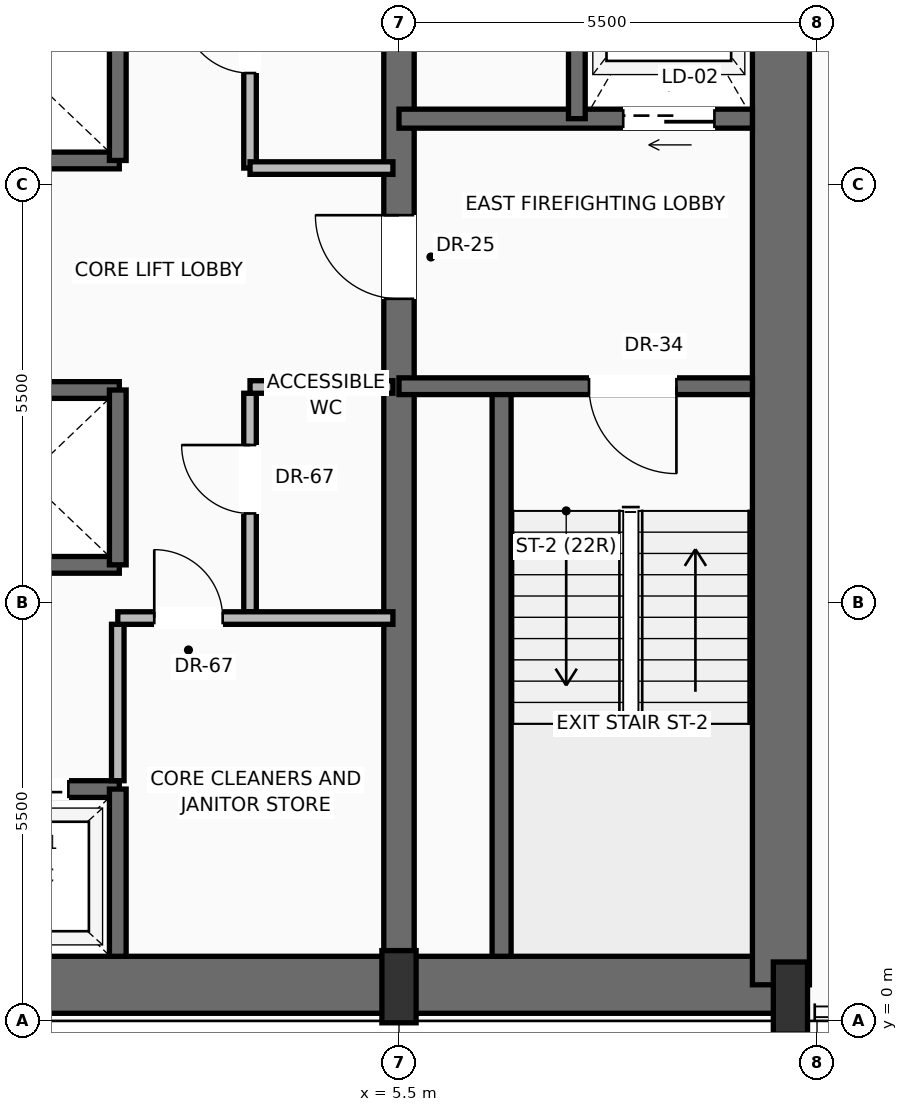
"""IFC4 building model, lengths in metres.
Left out: names, types, materials, properties, quantities, classifications, styles, units other than length and angle.
Written with IfcOpenShell. Run it as: python <this file> out.ifc"""

import sys

from ifc_helpers import new_model, si_unit, direction, frame, frame_2d, origin, origin_2d, place, context, subcontext, project, spatial, rectangle, extrude, source, transform, mapped, element, fill, save


model = new_model("IFC4")
c1 = context("Model", 3, precision=1e-05, world=origin(), true_north=direction((0.0, 1.0)))
c2 = subcontext(c1, "Body", "Model", "MODEL_VIEW")
j1 = project(units=[si_unit("LENGTHUNIT", "METRE"), si_unit("PLANEANGLEUNIT", "RADIAN")], contexts=[c1])
p1 = place(None, origin())
s1 = spatial("IfcSite", under=j1, at=p1, CompositionType="ELEMENT")
p2 = place(p1, origin())
s2 = spatial("IfcBuilding", under=s1, at=p2, CompositionType="ELEMENT")
p3 = place(p2, frame((0.0, 0.0, 98.8)))
s3 = spatial("IfcBuildingStorey", under=s2, at=p3, CompositionType="ELEMENT", Elevation=98.8)
p4 = place(p3, frame((-10.65, 0.475, 0.0), z_axis=(0.0, 0.0, 1.0), x_axis=(1.0, 0.0, 0.0)))
e1 = element("IfcWall", 1, at=p4, inside=s3, PredefinedType="SHEAR", context=c2, shape_type="SweptSolid", body=[
    extrude(rectangle(XDim=21.3, YDim=0.75, at=frame_2d((10.65, 0.0))), origin(), (0.0, 0.0, 1.0), 3.45),
])
p5 = place(p3, frame((10.525, 0.475, 0.0), z_axis=(0.0, 0.0, 1.0), x_axis=(0.0, 1.0, 0.0)))
e2 = element("IfcWall", 2, at=p5, inside=s3, PredefinedType="SHEAR", context=c2, shape_type="SweptSolid", body=[
    extrude(rectangle(XDim=15.65, YDim=0.75, at=frame_2d((7.825, 0.0))), origin(), (0.0, 0.0, 1.0), 3.45),
])
p6 = place(p3, frame((5.5, 0.475, 0.0), z_axis=(0.0, 0.0, 1.0), x_axis=(0.0, 1.0, 0.0)))
e3 = element("IfcWall", 3, at=p6, inside=s3, PredefinedType="SHEAR", context=c2, shape_type="SweptSolid", body=[
    extrude(rectangle(XDim=15.65, YDim=0.4, at=frame_2d((7.825, 0.0))), origin(), (0.0, 0.0, 1.0), 3.45),
])
p7 = place(p6, frame((9.025, 0.0, 0.0)))
e4 = element("IfcOpeningElement", 4, at=p7, cuts=e3, PredefinedType="OPENING", context=c2, shape_type="SweptSolid", body=[
    extrude(rectangle(XDim=1.1, YDim=2.2, at=frame_2d((0.55, 1.1))), frame((0.0, 0.21, 0.0), z_axis=(0.0, -1.0, 0.0), x_axis=(1.0, 0.0, 0.0)), (0.0, 0.0, 1.0), 0.42),
])
m1 = source(origin(), c2, "Body", "SweptSolid", [
    extrude(rectangle(XDim=0.45, YDim=0.95, at=origin_2d()), origin(), (0.0, 0.0, 1.0), 3.7),
])
for number, where, z_axis, x_axis in (
    (5, (5.5, 0.45, 0.0), (0.0, 0.0, 1.0), (1.0, 0.0, 0.0)),
    (6, (10.65, 0.3, 0.0), (0.0, 0.0, 1.0), (1.0, 0.0, 0.0)),
):
    element("IfcColumn", number, at=place(p3, frame(where, z_axis=z_axis, x_axis=x_axis)), inside=s3, PredefinedType="PILASTER", context=c2, shape_type="MappedRepresentation", body=[
        mapped(m1, transform((0.0, 0.0, 0.0), scale=1.0)),
    ])
p8 = place(p3, frame((6.85, 0.85, 0.0), z_axis=(0.0, 0.0, 1.0), x_axis=(0.0, 1.0, 0.0)))
e7 = element("IfcWall", 7, at=p8, inside=s3, PredefinedType="SOLIDWALL", context=c2, shape_type="SweptSolid", body=[
    extrude(rectangle(XDim=7.5, YDim=0.25, at=frame_2d((3.75, 0.0))), origin(), (0.0, 0.0, 1.0), 3.45),
])
p9 = place(p3, frame((10.15, 8.35, 0.0), z_axis=(0.0, 0.0, 1.0), x_axis=(-1.0, 0.0, 0.0)))
e8 = element("IfcWall", 8, at=p9, inside=s3, PredefinedType="SOLIDWALL", context=c2, shape_type="SweptSolid", body=[
    extrude(rectangle(XDim=4.65, YDim=0.22, at=frame_2d((2.325, 0.0))), origin(), (0.0, 0.0, 1.0), 3.45),
])
p10 = place(p9, frame((1.0, 0.0, 0.0)))
e9 = element("IfcOpeningElement", 9, at=p10, cuts=e8, PredefinedType="OPENING", context=c2, shape_type="SweptSolid", body=[
    extrude(rectangle(XDim=1.15, YDim=2.2, at=frame_2d((0.575, 1.1))), frame((0.0, 0.12, 0.0), z_axis=(0.0, -1.0, 0.0), x_axis=(1.0, 0.0, 0.0)), (0.0, 0.0, 1.0), 0.24),
])
p11 = place(p3, frame((10.15, 11.87, 0.0), z_axis=(0.0, 0.0, 1.0), x_axis=(-1.0, 0.0, 0.0)))
e10 = element("IfcWall", 10, at=p11, inside=s3, PredefinedType="SOLIDWALL", context=c2, shape_type="SweptSolid", body=[
    extrude(rectangle(XDim=4.65, YDim=0.25, at=frame_2d((2.325, 0.0))), origin(), (0.0, 0.0, 1.0), 3.45),
])
p12 = place(p11, frame((0.5, 0.0, 0.0)))
e11 = element("IfcOpeningElement", 11, at=p12, cuts=e10, PredefinedType="OPENING", context=c2, shape_type="SweptSolid", body=[
    extrude(rectangle(XDim=1.2, YDim=2.25, at=frame_2d((0.6, 1.125))), frame((0.0, 0.135, 0.0), z_axis=(0.0, -1.0, 0.0), x_axis=(1.0, 0.0, 0.0)), (0.0, 0.0, 1.0), 0.27),
])
p13 = place(p3, frame((7.84, 11.87, 0.0), z_axis=(0.0, 0.0, 1.0), x_axis=(0.0, 1.0, 0.0)))
e12 = element("IfcWall", 12, at=p13, inside=s3, PredefinedType="SOLIDWALL", context=c2, shape_type="SweptSolid", body=[
    extrude(rectangle(XDim=3.88, YDim=0.22, at=frame_2d((1.94, 0.0))), origin(), (0.0, 0.0, 1.0), 3.45),
])
p14 = place(p3, frame((-5.5, 3.05, 0.0), z_axis=(0.0, 0.0, 1.0), x_axis=(1.0, 0.0, 0.0)))
e13 = element("IfcWall", 13, at=p14, inside=s3, PredefinedType="SOLIDWALL", context=c2, shape_type="SweptSolid", body=[
    extrude(rectangle(XDim=7.32, YDim=0.22, at=frame_2d((3.66, 0.0))), origin(), (0.0, 0.0, 1.0), 3.45),
])
p15 = place(p14, frame((0.75, 0.0, 0.0)))
e14 = element("IfcOpeningElement", 14, at=p15, cuts=e13, PredefinedType="OPENING", context=c2, shape_type="SweptSolid", body=[
    extrude(rectangle(XDim=1.1, YDim=2.2, at=frame_2d((0.55, 1.1))), frame((0.0, 0.12, 0.0), z_axis=(0.0, -1.0, 0.0), x_axis=(1.0, 0.0, 0.0)), (0.0, 0.0, 1.0), 0.24),
])
p16 = place(p14, frame((3.15, 0.0, 0.0)))
e15 = element("IfcOpeningElement", 15, at=p16, cuts=e13, PredefinedType="OPENING", context=c2, shape_type="SweptSolid", body=[
    extrude(rectangle(XDim=1.1, YDim=2.2, at=frame_2d((0.55, 1.1))), frame((0.0, 0.12, 0.0), z_axis=(0.0, -1.0, 0.0), x_axis=(1.0, 0.0, 0.0)), (0.0, 0.0, 1.0), 0.24),
])
p17 = place(p14, frame((5.55, 0.0, 0.0)))
e16 = element("IfcOpeningElement", 16, at=p17, cuts=e13, PredefinedType="OPENING", context=c2, shape_type="SweptSolid", body=[
    extrude(rectangle(XDim=1.1, YDim=2.2, at=frame_2d((0.55, 1.1))), frame((0.0, 0.12, 0.0), z_axis=(0.0, -1.0, 0.0), x_axis=(1.0, 0.0, 0.0)), (0.0, 0.0, 1.0), 0.24),
])
p18 = place(p3, frame((1.8, 0.85, 0.0), z_axis=(0.0, 0.0, 1.0), x_axis=(0.0, 1.0, 0.0)))
e17 = element("IfcWall", 17, at=p18, inside=s3, PredefinedType="SOLIDWALL", context=c2, shape_type="SweptSolid", body=[
    extrude(rectangle(XDim=2.2, YDim=0.22, at=frame_2d((1.1, 0.0))), origin(), (0.0, 0.0, 1.0), 3.45),
])
p19 = place(p3, frame((1.8, 3.16, 0.0), z_axis=(0.0, 0.0, 1.0), x_axis=(0.0, 1.0, 0.0)))
e18 = element("IfcWall", 18, at=p19, inside=s3, PredefinedType="PARTITIONING", context=c2, shape_type="SweptSolid", body=[
    extrude(rectangle(XDim=2.058, YDim=0.165, at=frame_2d((1.029, 0.0))), origin(), (0.0, 0.0, 1.0), 3.442),
])
p20 = place(p3, frame((3.54, 5.383, 0.0), z_axis=(0.0, 0.0, 1.0), x_axis=(0.0, 1.0, 0.0)))
e19 = element("IfcWall", 19, at=p20, inside=s3, PredefinedType="PARTITIONING", context=c2, shape_type="SweptSolid", body=[
    extrude(rectangle(XDim=2.875, YDim=0.165, at=frame_2d((1.438, 0.0))), origin(), (0.0, 0.0, 1.0), 3.442),
])
p21 = place(p20, frame((1.294, 0.0, 0.0)))
e20 = element("IfcOpeningElement", 20, at=p21, cuts=e19, PredefinedType="OPENING", context=c2, shape_type="SweptSolid", body=[
    extrude(rectangle(XDim=0.9, YDim=2.1, at=frame_2d((0.45, 1.05))), frame((0.0, 0.093, 0.0), z_axis=(0.0, -1.0, 0.0), x_axis=(1.0, 0.0, 0.0)), (0.0, 0.0, 1.0), 0.185),
])
p22 = place(p3, frame((3.54, 8.34, 0.0), z_axis=(0.0, 0.0, 1.0), x_axis=(1.0, 0.0, 0.0)))
e21 = element("IfcWall", 21, at=p22, inside=s3, PredefinedType="PARTITIONING", context=c2, shape_type="SweptSolid", body=[
    extrude(rectangle(XDim=1.88, YDim=0.165, at=frame_2d((0.94, 0.0))), origin(), (0.0, 0.0, 1.0), 3.442),
])
p23 = place(p3, frame((1.8, 5.3, 0.0), z_axis=(0.0, 0.0, 1.0), x_axis=(1.0, 0.0, 0.0)))
e22 = element("IfcWall", 22, at=p23, inside=s3, PredefinedType="PARTITIONING", context=c2, shape_type="SweptSolid", body=[
    extrude(rectangle(XDim=3.62, YDim=0.165, at=frame_2d((1.81, 0.0))), origin(), (0.0, 0.0, 1.0), 3.442),
])
p24 = place(p23, frame((0.48, 0.0, 0.0)))
e23 = element("IfcOpeningElement", 23, at=p24, cuts=e22, PredefinedType="OPENING", context=c2, shape_type="SweptSolid", body=[
    extrude(rectangle(XDim=0.9, YDim=2.1, at=frame_2d((0.45, 1.05))), frame((0.0, 0.093, 0.0), z_axis=(0.0, -1.0, 0.0), x_axis=(1.0, 0.0, 0.0)), (0.0, 0.0, 1.0), 0.185),
])
for number, where, z_axis, x_axis in (
    (24, (-5.5, 6.0, 0.0), (0.0, 0.0, 1.0), (1.0, 0.0, 0.0)),
    (25, (-5.5, 8.3, 0.0), (0.0, 0.0, 1.0), (1.0, 0.0, 0.0)),
):
    element("IfcWall", number, at=place(p3, frame(where, z_axis=z_axis, x_axis=x_axis)), inside=s3, PredefinedType="SOLIDWALL", context=c2, shape_type="SweptSolid", body=[
        extrude(rectangle(XDim=7.32, YDim=0.22, at=frame_2d((3.66, 0.0))), origin(), (0.0, 0.0, 1.0), 3.45),
    ])
p25 = place(p3, frame((1.8, 6.0, 0.0), z_axis=(0.0, 0.0, 1.0), x_axis=(0.0, 1.0, 0.0)))
e26 = element("IfcWall", 26, at=p25, inside=s3, PredefinedType="SOLIDWALL", context=c2, shape_type="SweptSolid", body=[
    extrude(rectangle(XDim=2.3, YDim=0.22, at=frame_2d((1.15, 0.0))), origin(), (0.0, 0.0, 1.0), 3.45),
])
p26 = place(p3, frame((-5.5, 11.32, 0.0), z_axis=(0.0, 0.0, 1.0), x_axis=(1.0, 0.0, 0.0)))
e27 = element("IfcWall", 27, at=p26, inside=s3, PredefinedType="SOLIDWALL", context=c2, shape_type="SweptSolid", body=[
    extrude(rectangle(XDim=7.32, YDim=0.22, at=frame_2d((3.66, 0.0))), origin(), (0.0, 0.0, 1.0), 3.45),
])
p27 = place(p3, frame((1.8, 11.32, 0.0), z_axis=(0.0, 0.0, 1.0), x_axis=(0.0, 1.0, 0.0)))
e28 = element("IfcWall", 28, at=p27, inside=s3, PredefinedType="SOLIDWALL", context=c2, shape_type="SweptSolid", body=[
    extrude(rectangle(XDim=2.3, YDim=0.22, at=frame_2d((1.15, 0.0))), origin(), (0.0, 0.0, 1.0), 3.45),
])
p28 = place(p3, frame((3.54, 11.22, 0.0), z_axis=(0.0, 0.0, 1.0), x_axis=(0.0, 1.0, 0.0)))
e29 = element("IfcWall", 29, at=p28, inside=s3, PredefinedType="PARTITIONING", context=c2, shape_type="SweptSolid", body=[
    extrude(rectangle(XDim=4.53, YDim=0.165, at=frame_2d((2.265, 0.0))), origin(), (0.0, 0.0, 1.0), 3.442),
])
p29 = place(p28, frame((1.25, 0.0, 0.0)))
e30 = element("IfcOpeningElement", 30, at=p29, cuts=e29, PredefinedType="OPENING", context=c2, shape_type="SweptSolid", body=[
    extrude(rectangle(XDim=0.9, YDim=2.1, at=frame_2d((0.45, 1.05))), frame((0.0, 0.093, 0.0), z_axis=(0.0, -1.0, 0.0), x_axis=(1.0, 0.0, 0.0)), (0.0, 0.0, 1.0), 0.185),
])
p30 = place(p3, frame((3.54, 11.22, 0.0), z_axis=(0.0, 0.0, 1.0), x_axis=(1.0, 0.0, 0.0)))
e31 = element("IfcWall", 31, at=p30, inside=s3, PredefinedType="PARTITIONING", context=c2, shape_type="SweptSolid", body=[
    extrude(rectangle(XDim=1.88, YDim=0.165, at=frame_2d((0.94, 0.0))), origin(), (0.0, 0.0, 1.0), 3.442),
])
m2 = source(origin(), c2, "Body", "SweptSolid", [
    extrude(rectangle(XDim=1.15, YDim=2.2, at=frame_2d((0.575, 1.1))), frame((0.0, 0.025, 0.0), z_axis=(0.0, -1.0, 0.0), x_axis=(1.0, 0.0, 0.0)), (0.0, 0.0, 1.0), 0.05),
])
p31 = place(p10, origin())
e32 = element("IfcDoor", 32, at=p31, inside=s3, OperationType="SINGLE_SWING_LEFT", PredefinedType="DOOR", context=c2, shape_type="MappedRepresentation", body=[
    mapped(m2, transform((0.0, 0.0, 0.0), scale=1.0)),
])
fill(e9, e32)
m3 = source(origin(), c2, "Body", "SweptSolid", [
    extrude(rectangle(XDim=1.1, YDim=2.2, at=frame_2d((0.55, 1.1))), frame((0.0, 0.025, 0.0), z_axis=(0.0, -1.0, 0.0), x_axis=(1.0, 0.0, 0.0)), (0.0, 0.0, 1.0), 0.05),
])
p32 = place(p7, origin())
e33 = element("IfcDoor", 33, at=p32, inside=s3, OperationType="SINGLE_SWING_RIGHT", PredefinedType="DOOR", context=c2, shape_type="MappedRepresentation", body=[
    mapped(m3, transform((0.0, 0.0, 0.0), scale=1.0)),
])
fill(e4, e33)
m4 = source(origin(), c2, "Body", "SweptSolid", [
    extrude(rectangle(XDim=1.2, YDim=2.25, at=frame_2d((0.6, 1.125))), frame((0.0, 0.025, 0.0), z_axis=(0.0, -1.0, 0.0), x_axis=(1.0, 0.0, 0.0)), (0.0, 0.0, 1.0), 0.05),
])
p33 = place(p12, origin())
e34 = element("IfcDoor", 34, at=p33, inside=s3, OperationType="SLIDING_TO_RIGHT", PredefinedType="DOOR", context=c2, shape_type="MappedRepresentation", body=[
    mapped(m4, transform((0.0, 0.0, 0.0), scale=1.0)),
])
fill(e11, e34)
m5 = source(origin(), c2, "Body", "SweptSolid", [
    extrude(rectangle(XDim=1.1, YDim=2.2, at=frame_2d((0.55, 1.1))), frame((0.0, 0.025, 0.0), z_axis=(0.0, -1.0, 0.0), x_axis=(1.0, 0.0, 0.0)), (0.0, 0.0, 1.0), 0.05),
])
p34 = place(p17, origin())
e35 = element("IfcDoor", 35, at=p34, inside=s3, OperationType="SLIDING_TO_RIGHT", PredefinedType="DOOR", context=c2, shape_type="MappedRepresentation", body=[
    mapped(m5, transform((0.0, 0.0, 0.0), scale=1.0)),
])
fill(e16, e35)
m6 = source(origin(), c2, "Body", "SweptSolid", [
    extrude(rectangle(XDim=0.9, YDim=2.1, at=frame_2d((0.45, 1.05))), frame((0.0, 0.025, 0.0), z_axis=(0.0, -1.0, 0.0), x_axis=(1.0, 0.0, 0.0)), (0.0, 0.0, 1.0), 0.05),
])
p35 = place(p24, origin())
e36 = element("IfcDoor", 36, at=p35, inside=s3, OperationType="SINGLE_SWING_LEFT", PredefinedType="DOOR", context=c2, shape_type="MappedRepresentation", body=[
    mapped(m6, transform((0.0, 0.0, 0.0), scale=1.0)),
])
fill(e23, e36)
p36 = place(p21, origin())
e37 = element("IfcDoor", 37, at=p36, inside=s3, OperationType="SINGLE_SWING_RIGHT", PredefinedType="DOOR", context=c2, shape_type="MappedRepresentation", body=[
    mapped(m6, transform((0.0, 0.0, 0.0), scale=1.0)),
])
fill(e20, e37)
p37 = place(p29, origin())
e38 = element("IfcDoor", 38, at=p37, inside=s3, OperationType="SINGLE_SWING_RIGHT", PredefinedType="DOOR", context=c2, shape_type="MappedRepresentation", body=[
    mapped(m6, transform((0.0, 0.0, 0.0), scale=1.0)),
])
fill(e30, e38)
save(model, sys.argv[1])
